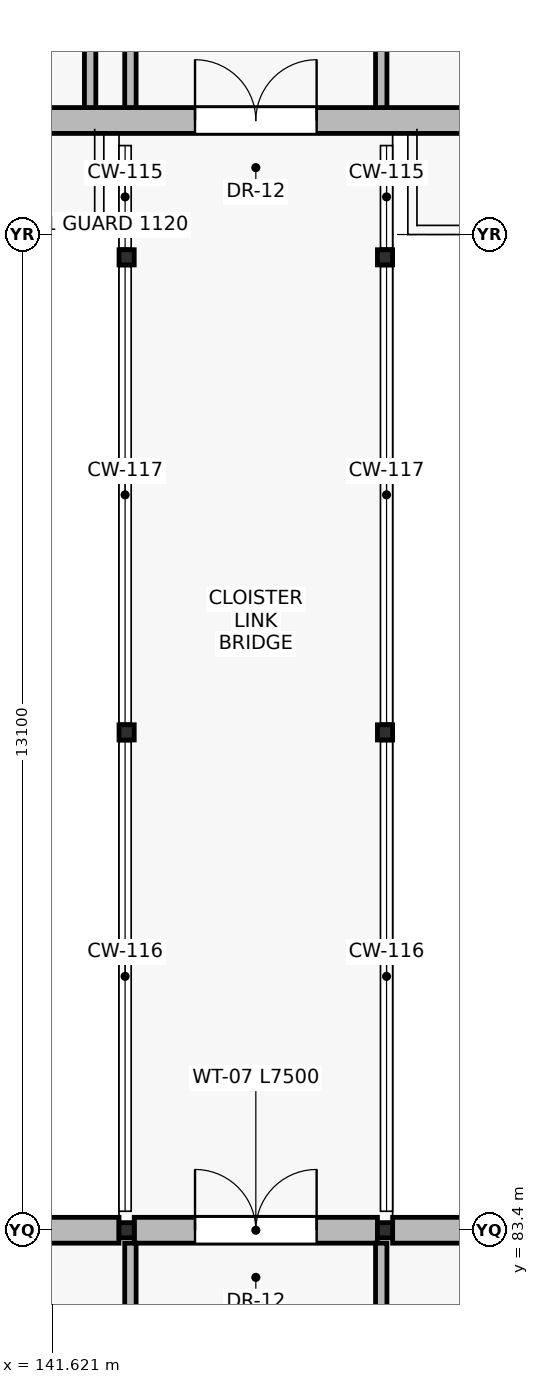
"""IFC4 building model, lengths in metres.
Left out: names, types, materials, properties, quantities, classifications, styles, units other than length and angle.
Written with IfcOpenShell. Run it as: python <this file> out.ifc"""

import sys

from ifc_helpers import new_model, si_unit, direction, frame, frame_2d, origin, origin_2d, place, context, subcontext, project, spatial, rectangle, hollow_rectangle, extrude, element, fill, save


model = new_model("IFC4")
c1 = context("Model", 3, precision=1e-05, world=origin(), true_north=direction((0.0, 1.0)))
c2 = subcontext(c1, "Body", "Model", "MODEL_VIEW")
j1 = project(units=[si_unit("LENGTHUNIT", "METRE"), si_unit("PLANEANGLEUNIT", "RADIAN")], contexts=[c1])
p1 = place(None, origin())
s1 = spatial("IfcSite", under=j1, at=p1, CompositionType="ELEMENT")
p2 = place(p1, origin())
s2 = spatial("IfcBuilding", under=s1, at=p2, CompositionType="ELEMENT")
p3 = place(p2, frame((0.0, 0.0, 4.8)))
s3 = spatial("IfcBuildingStorey", under=s2, at=p3, CompositionType="ELEMENT", Elevation=4.8)
for number, where, z_axis, x_axis in (
    (1, (142.6, 83.4, 0.0), (0.0, 0.0, 1.0), (1.0, 0.0, 0.0)),
    (2, (146.0, 83.4, 0.0), (0.0, 0.0, 1.0), (1.0, 0.0, 0.0)),
    (3, (142.6, 89.95, 0.0), (0.0, 0.0, 1.0), (1.0, 0.0, 0.0)),
    (4, (146.0, 89.95, 0.0), (0.0, 0.0, 1.0), (1.0, 0.0, 0.0)),
    (5, (142.6, 96.2, 0.0), (0.0, 0.0, 1.0), (1.0, 0.0, 0.0)),
    (6, (146.0, 96.2, 0.0), (0.0, 0.0, 1.0), (1.0, 0.0, 0.0)),
):
    element("IfcColumn", number, at=place(p3, frame(where, z_axis=z_axis, x_axis=x_axis)), inside=s3, PredefinedType="COLUMN", context=c2, shape_type="SweptSolid", body=[
        extrude(hollow_rectangle(XDim=0.2, YDim=0.2, WallThickness=0.01, at=origin_2d()), origin(), (0.0, 0.0, 1.0), 4.8),
    ])
p4 = place(p3, frame((140.55, 83.4, 0.0), z_axis=(0.0, 0.0, 1.0), x_axis=(1.0, 0.0, 0.0)))
e7 = element("IfcWall", 7, at=p4, inside=s3, PredefinedType="STANDARD", context=c2, shape_type="SweptSolid", body=[
    extrude(rectangle(XDim=1.95, YDim=0.34, at=frame_2d((0.975, 0.0))), origin(), (0.0, 0.0, 1.0), 4.75),
])
p5 = place(p3, frame((142.7, 83.4, 0.0), z_axis=(0.0, 0.0, 1.0), x_axis=(1.0, 0.0, 0.0)))
e8 = element("IfcWall", 8, at=p5, inside=s3, PredefinedType="STANDARD", context=c2, shape_type="SweptSolid", body=[
    extrude(rectangle(XDim=3.2, YDim=0.34, at=frame_2d((1.6, 0.0))), origin(), (0.0, 0.0, 1.0), 4.26),
])
p6 = place(p5, frame((0.8, 0.0, 0.0)))
e9 = element("IfcOpeningElement", 9, at=p6, cuts=e8, PredefinedType="OPENING", context=c2, shape_type="SweptSolid", body=[
    extrude(rectangle(XDim=1.6, YDim=2.2, at=frame_2d((0.8, 1.1))), frame((0.0, 0.18, 0.0), z_axis=(0.0, -1.0, 0.0), x_axis=(1.0, 0.0, 0.0)), (0.0, 0.0, 1.0), 0.36),
])
p7 = place(p3, frame((146.1, 83.4, 0.0), z_axis=(0.0, 0.0, 1.0), x_axis=(1.0, 0.0, 0.0)))
e10 = element("IfcWall", 10, at=p7, inside=s3, PredefinedType="STANDARD", context=c2, shape_type="SweptSolid", body=[
    extrude(rectangle(XDim=1.95, YDim=0.34, at=frame_2d((0.975, 0.0))), origin(), (0.0, 0.0, 1.0), 4.75),
])
p8 = place(p3, frame((148.2, 98.0, 0.0), z_axis=(0.0, 0.0, 1.0), x_axis=(-1.0, 0.0, 0.0)))
e11 = element("IfcWall", 11, at=p8, inside=s3, PredefinedType="STANDARD", context=c2, shape_type="SweptSolid", body=[
    extrude(rectangle(XDim=7.8, YDim=0.34, at=frame_2d((3.9, 0.0))), origin(), (0.0, 0.0, 1.0), 4.54),
])
p9 = place(p8, frame((3.1, 0.0, 0.0)))
e12 = element("IfcOpeningElement", 12, at=p9, cuts=e11, PredefinedType="OPENING", context=c2, shape_type="SweptSolid", body=[
    extrude(rectangle(XDim=1.6, YDim=2.2, at=frame_2d((0.8, 1.1))), frame((0.0, 0.18, 0.0), z_axis=(0.0, -1.0, 0.0), x_axis=(1.0, 0.0, 0.0)), (0.0, 0.0, 1.0), 0.36),
])
for number, where, z_axis, x_axis in (
    (13, (142.65, 75.0, 0.0), (0.0, 0.0, 1.0), (0.0, 1.0, 0.0)),
    (14, (145.95, 75.0, 0.0), (0.0, 0.0, 1.0), (0.0, 1.0, 0.0)),
):
    element("IfcWall", number, at=place(p3, frame(where, z_axis=z_axis, x_axis=x_axis)), inside=s3, PredefinedType="PARTITIONING", context=c2, shape_type="SweptSolid", body=[
        extrude(rectangle(XDim=8.23, YDim=0.15, at=frame_2d((4.115, 0.0))), origin(), (0.0, 0.0, 1.0), 4.54),
    ])
for number, where, z_axis, x_axis in (
    (15, (142.65, 98.17, 0.0), (0.0, 0.0, 1.0), (0.0, 1.0, 0.0)),
    (16, (145.95, 98.17, 0.0), (0.0, 0.0, 1.0), (0.0, 1.0, 0.0)),
):
    element("IfcWall", number, at=place(p3, frame(where, z_axis=z_axis, x_axis=x_axis)), inside=s3, PredefinedType="PARTITIONING", context=c2, shape_type="SweptSolid", body=[
        extrude(rectangle(XDim=6.48, YDim=0.15, at=frame_2d((3.24, 0.0))), origin(), (0.0, 0.0, 1.0), 4.21),
    ])
p10 = place(p3, frame((142.12, 98.17, 0.0), z_axis=(0.0, 0.0, 1.0), x_axis=(0.0, 1.0, 0.0)))
e17 = element("IfcWall", 17, at=p10, inside=s3, PredefinedType="PARTITIONING", context=c2, shape_type="SweptSolid", body=[
    extrude(rectangle(XDim=6.405, YDim=0.15, at=frame_2d((3.203, 0.0))), origin(), (0.0, 0.0, 1.0), 4.54),
])
p11 = place(p6, origin())
e18 = element("IfcDoor", 18, at=p11, inside=s3, OperationType="DOUBLE_DOOR_SINGLE_SWING", PredefinedType="DOOR", context=c2, shape_type="SweptSolid", body=[
    extrude(rectangle(XDim=1.6, YDim=2.2, at=frame_2d((0.8, 1.1))), frame((0.0, 0.025, 0.0), z_axis=(0.0, -1.0, 0.0), x_axis=(1.0, 0.0, 0.0)), (0.0, 0.0, 1.0), 0.05),
])
fill(e9, e18)
p12 = place(p9, frame((1.6, 0.0, 0.0), z_axis=(0.0, 0.0, 1.0), x_axis=(-1.0, 0.0, 0.0)))
e19 = element("IfcDoor", 19, at=p12, inside=s3, OperationType="DOUBLE_DOOR_SINGLE_SWING", PredefinedType="DOOR", context=c2, shape_type="SweptSolid", body=[
    extrude(rectangle(XDim=1.6, YDim=2.2, at=frame_2d((0.8, 1.1))), frame((0.0, 0.025, 0.0), z_axis=(0.0, -1.0, 0.0), x_axis=(1.0, 0.0, 0.0)), (0.0, 0.0, 1.0), 0.05),
])
fill(e12, e19)
save(model, sys.argv[1])
